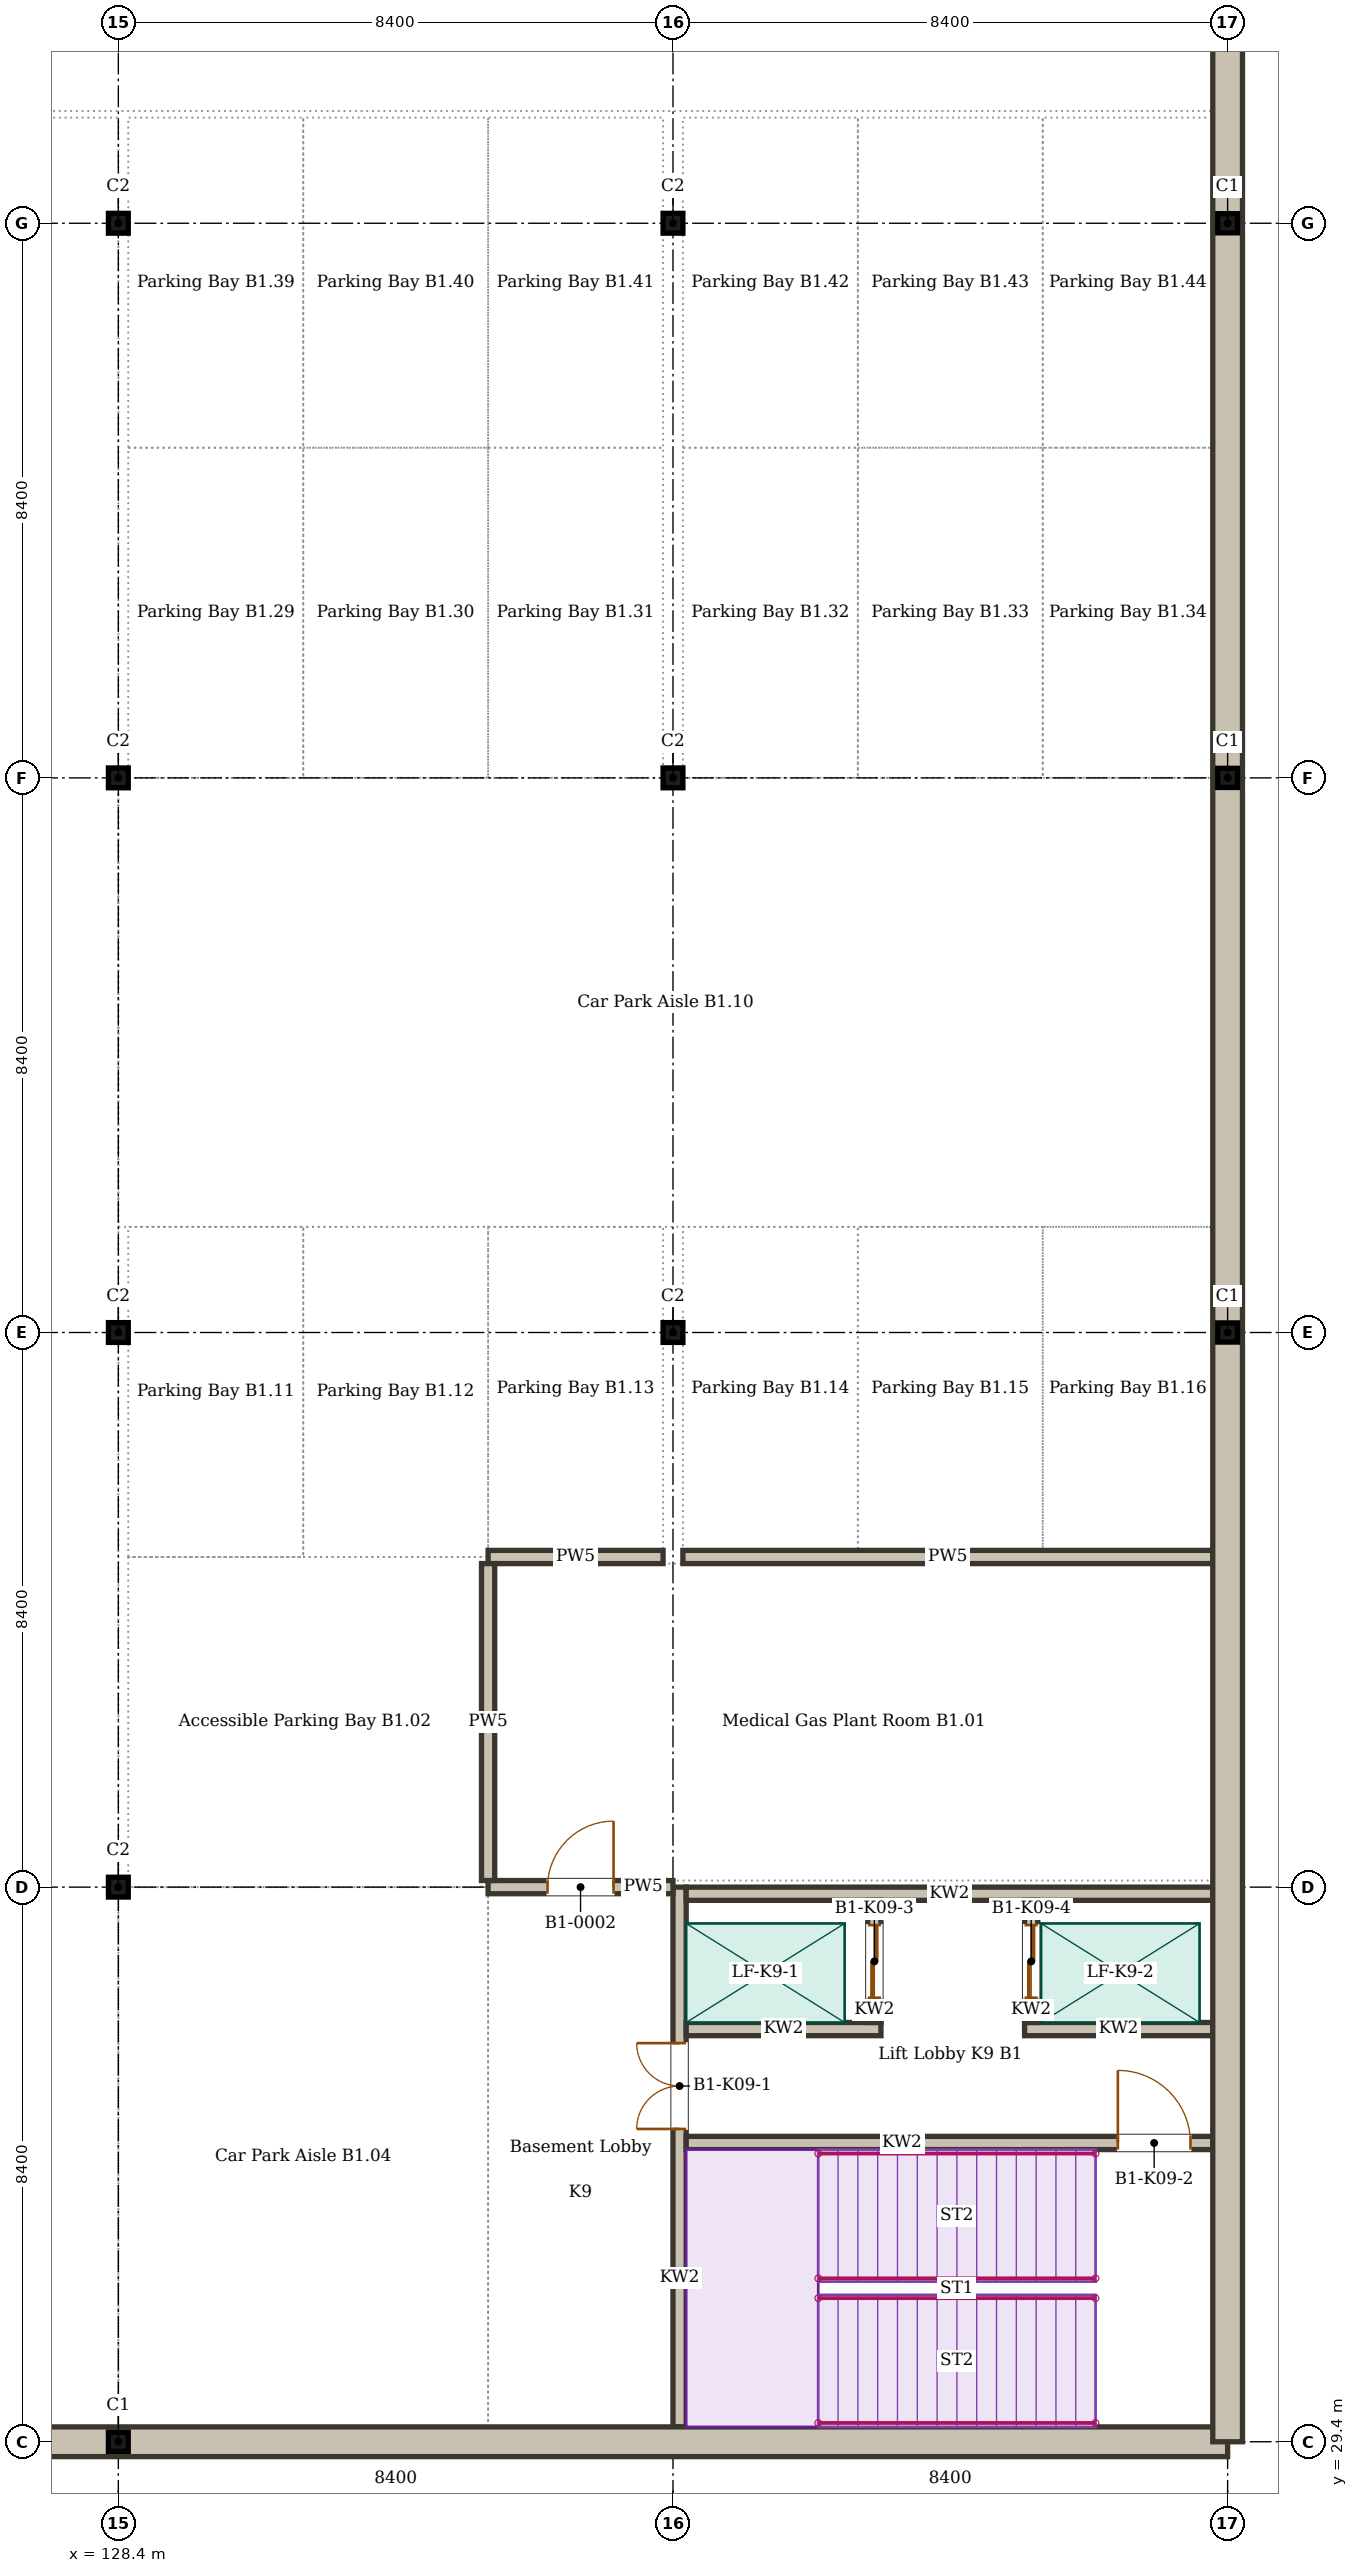
"""IFC4 building model, lengths in metres.
Left out: names, types, materials, properties, quantities, classifications, styles, units other than length and angle.
Written with IfcOpenShell. Run it as: python <this file> out.ifc"""

import sys

from ifc_helpers import new_model, si_unit, direction, frame, frame_2d, origin, origin_2d, place, context, subcontext, project, spatial, rectangle, i_section, extrude, element, fill, save


model = new_model("IFC4")
c1 = context("Model", 3, precision=1e-05, world=origin(), true_north=direction((0.0, 1.0)))
c2 = subcontext(c1, "Body", "Model", "MODEL_VIEW")
j1 = project(units=[si_unit("LENGTHUNIT", "METRE"), si_unit("PLANEANGLEUNIT", "RADIAN")], contexts=[c1])
p1 = place(None, origin())
s1 = spatial("IfcSite", under=j1, at=p1, CompositionType="ELEMENT")
p2 = place(p1, origin())
s2 = spatial("IfcBuilding", under=s1, at=p2, CompositionType="ELEMENT")
p3 = place(p2, frame((0.0, 0.0, -4.5)))
s3 = spatial("IfcBuildingStorey", under=s2, at=p3, CompositionType="ELEMENT", Elevation=-4.5)
p4 = place(p3, frame((128.4, 29.4, 0.0), z_axis=(0.0, 0.0, 1.0), x_axis=(1.0, 0.0, 0.0)))
e1 = element("IfcColumn", 1, at=p4, inside=s3, PredefinedType="COLUMN", context=c2, shape_type="SweptSolid", body=[
    extrude(i_section(OverallWidth=0.3, OverallDepth=0.29, WebThickness=0.009, FlangeThickness=0.014, FilletRadius=0.027, at=origin_2d()), origin(), (0.0, 0.0, 1.0), 4.5),
])
for number, where, z_axis, x_axis in (
    (2, (128.4, 37.8, 0.0), (0.0, 0.0, 1.0), (1.0, 0.0, 0.0)),
    (3, (128.4, 46.2, 0.0), (0.0, 0.0, 1.0), (1.0, 0.0, 0.0)),
    (4, (136.8, 46.2, 0.0), (0.0, 0.0, 1.0), (1.0, 0.0, 0.0)),
):
    element("IfcColumn", number, at=place(p3, frame(where, z_axis=z_axis, x_axis=x_axis)), inside=s3, PredefinedType="COLUMN", context=c2, shape_type="SweptSolid", body=[
        extrude(i_section(OverallWidth=0.3, OverallDepth=0.3, WebThickness=0.011, FlangeThickness=0.019, FilletRadius=0.027, at=origin_2d()), origin(), (0.0, 0.0, 1.0), 4.5),
    ])
p5 = place(p3, frame((145.2, 46.2, 0.0), z_axis=(0.0, 0.0, 1.0), x_axis=(1.0, 0.0, 0.0)))
e5 = element("IfcColumn", 5, at=p5, inside=s3, PredefinedType="COLUMN", context=c2, shape_type="SweptSolid", body=[
    extrude(i_section(OverallWidth=0.3, OverallDepth=0.29, WebThickness=0.009, FlangeThickness=0.014, FilletRadius=0.027, at=origin_2d()), origin(), (0.0, 0.0, 1.0), 4.5),
])
for number, where, z_axis, x_axis in (
    (6, (128.4, 54.6, 0.0), (0.0, 0.0, 1.0), (1.0, 0.0, 0.0)),
    (7, (136.8, 54.6, 0.0), (0.0, 0.0, 1.0), (1.0, 0.0, 0.0)),
):
    element("IfcColumn", number, at=place(p3, frame(where, z_axis=z_axis, x_axis=x_axis)), inside=s3, PredefinedType="COLUMN", context=c2, shape_type="SweptSolid", body=[
        extrude(i_section(OverallWidth=0.3, OverallDepth=0.3, WebThickness=0.011, FlangeThickness=0.019, FilletRadius=0.027, at=origin_2d()), origin(), (0.0, 0.0, 1.0), 4.5),
    ])
p6 = place(p3, frame((145.2, 54.6, 0.0), z_axis=(0.0, 0.0, 1.0), x_axis=(1.0, 0.0, 0.0)))
e8 = element("IfcColumn", 8, at=p6, inside=s3, PredefinedType="COLUMN", context=c2, shape_type="SweptSolid", body=[
    extrude(i_section(OverallWidth=0.3, OverallDepth=0.29, WebThickness=0.009, FlangeThickness=0.014, FilletRadius=0.027, at=origin_2d()), origin(), (0.0, 0.0, 1.0), 4.5),
])
for number, where, z_axis, x_axis in (
    (9, (128.4, 63.0, 0.0), (0.0, 0.0, 1.0), (1.0, 0.0, 0.0)),
    (10, (136.8, 63.0, 0.0), (0.0, 0.0, 1.0), (1.0, 0.0, 0.0)),
):
    element("IfcColumn", number, at=place(p3, frame(where, z_axis=z_axis, x_axis=x_axis)), inside=s3, PredefinedType="COLUMN", context=c2, shape_type="SweptSolid", body=[
        extrude(i_section(OverallWidth=0.3, OverallDepth=0.3, WebThickness=0.011, FlangeThickness=0.019, FilletRadius=0.027, at=origin_2d()), origin(), (0.0, 0.0, 1.0), 4.5),
    ])
p7 = place(p3, frame((145.2, 63.0, 0.0), z_axis=(0.0, 0.0, 1.0), x_axis=(1.0, 0.0, 0.0)))
e11 = element("IfcColumn", 11, at=p7, inside=s3, PredefinedType="COLUMN", context=c2, shape_type="SweptSolid", body=[
    extrude(i_section(OverallWidth=0.3, OverallDepth=0.29, WebThickness=0.009, FlangeThickness=0.014, FilletRadius=0.027, at=origin_2d()), origin(), (0.0, 0.0, 1.0), 4.5),
])
p8 = place(p3, frame((111.6, 29.4, 0.0), z_axis=(0.0, 0.0, 1.0), x_axis=(1.0, 0.0, 0.0)))
e12 = element("IfcWall", 12, at=p8, inside=s3, PredefinedType="SOLIDWALL", context=c2, shape_type="SweptSolid", body=[
    extrude(rectangle(XDim=33.6, YDim=0.45, at=frame_2d((16.8, 0.0))), origin(), (0.0, 0.0, 1.0), 4.35),
])
p9 = place(p3, frame((145.2, 29.4, 0.0), z_axis=(0.0, 0.0, 1.0), x_axis=(0.0, 1.0, 0.0)))
e13 = element("IfcWall", 13, at=p9, inside=s3, PredefinedType="SOLIDWALL", context=c2, shape_type="SweptSolid", body=[
    extrude(rectangle(XDim=75.6, YDim=0.45, at=frame_2d((37.8, 0.0))), origin(), (0.0, 0.0, 1.0), 4.35),
])
p10 = place(p3, frame((134.0, 37.8, 0.0), z_axis=(0.0, 0.0, 1.0), x_axis=(1.0, 0.0, 0.0)))
e14 = element("IfcWall", 14, at=p10, inside=s3, PredefinedType="SOLIDWALL", context=c2, shape_type="SweptSolid", body=[
    extrude(rectangle(XDim=2.8, YDim=0.2, at=frame_2d((1.4, 0.0))), origin(), (0.0, 0.0, 1.0), 3.8),
])
p11 = place(p10, frame((0.9, 0.0, 0.0)))
e15 = element("IfcOpeningElement", 15, at=p11, cuts=e14, PredefinedType="OPENING", context=c2, shape_type="SweptSolid", body=[
    extrude(rectangle(XDim=1.0, YDim=2.1, at=frame_2d((0.5, 1.05))), frame((0.0, 0.11, 0.0), z_axis=(0.0, -1.0, 0.0), x_axis=(1.0, 0.0, 0.0)), (0.0, 0.0, 1.0), 0.22),
])
p12 = place(p3, frame((134.0, 42.8, 0.0), z_axis=(0.0, 0.0, 1.0), x_axis=(1.0, 0.0, 0.0)))
e16 = element("IfcWall", 16, at=p12, inside=s3, PredefinedType="SOLIDWALL", context=c2, shape_type="SweptSolid", body=[
    extrude(rectangle(XDim=2.65, YDim=0.2, at=frame_2d((1.325, 0.0))), origin(), (0.0, 0.0, 1.0), 3.95),
])
p13 = place(p3, frame((136.95, 42.8, 0.0), z_axis=(0.0, 0.0, 1.0), x_axis=(1.0, 0.0, 0.0)))
e17 = element("IfcWall", 17, at=p13, inside=s3, PredefinedType="SOLIDWALL", context=c2, shape_type="SweptSolid", body=[
    extrude(rectangle(XDim=8.025, YDim=0.2, at=frame_2d((4.013, 0.0))), origin(), (0.0, 0.0, 1.0), 3.95),
])
p14 = place(p3, frame((134.0, 37.9, 0.0), z_axis=(0.0, 0.0, 1.0), x_axis=(0.0, 1.0, 0.0)))
e18 = element("IfcWall", 18, at=p14, inside=s3, PredefinedType="SOLIDWALL", context=c2, shape_type="SweptSolid", body=[
    extrude(rectangle(XDim=4.8, YDim=0.2, at=frame_2d((2.4, 0.0))), origin(), (0.0, 0.0, 1.0), 3.8),
])
p15 = place(p3, frame((136.9, 29.625, 0.0), z_axis=(0.0, 0.0, 1.0), x_axis=(0.0, 1.0, 0.0)))
e19 = element("IfcWall", 19, at=p15, inside=s3, PredefinedType="SOLIDWALL", context=c2, shape_type="SweptSolid", body=[
    extrude(rectangle(XDim=8.175, YDim=0.2, at=frame_2d((4.087, 0.0))), origin(), (0.0, 0.0, 1.0), 4.5),
])
p16 = place(p15, frame((4.512, 0.0, 0.0)))
e20 = element("IfcOpeningElement", 20, at=p16, cuts=e19, PredefinedType="OPENING", context=c2, shape_type="SweptSolid", body=[
    extrude(rectangle(XDim=1.3, YDim=2.1, at=frame_2d((0.65, 1.05))), frame((0.0, 0.11, 0.0), z_axis=(0.0, -1.0, 0.0), x_axis=(1.0, 0.0, 0.0)), (0.0, 0.0, 1.0), 0.22),
])
p17 = place(p3, frame((137.0, 37.7, 0.0), z_axis=(0.0, 0.0, 1.0), x_axis=(1.0, 0.0, 0.0)))
e21 = element("IfcWall", 21, at=p17, inside=s3, PredefinedType="SOLIDWALL", context=c2, shape_type="SweptSolid", body=[
    extrude(rectangle(XDim=7.975, YDim=0.2, at=frame_2d((3.988, 0.0))), origin(), (0.0, 0.0, 1.0), 4.5),
])
p18 = place(p3, frame((137.0, 33.925, 0.0), z_axis=(0.0, 0.0, 1.0), x_axis=(1.0, 0.0, 0.0)))
e22 = element("IfcWall", 22, at=p18, inside=s3, PredefinedType="SOLIDWALL", context=c2, shape_type="SweptSolid", body=[
    extrude(rectangle(XDim=7.975, YDim=0.2, at=frame_2d((3.988, 0.0))), origin(), (0.0, 0.0, 1.0), 4.5),
])
p19 = place(p18, frame((6.538, 0.0, 0.0)))
e23 = element("IfcOpeningElement", 23, at=p19, cuts=e22, PredefinedType="OPENING", context=c2, shape_type="SweptSolid", body=[
    extrude(rectangle(XDim=1.1, YDim=2.1, at=frame_2d((0.55, 1.05))), frame((0.0, 0.11, 0.0), z_axis=(0.0, -1.0, 0.0), x_axis=(1.0, 0.0, 0.0)), (0.0, 0.0, 1.0), 0.22),
])
p20 = place(p3, frame((137.0, 35.65, 0.0), z_axis=(0.0, 0.0, 1.0), x_axis=(1.0, 0.0, 0.0)))
e24 = element("IfcWall", 24, at=p20, inside=s3, PredefinedType="SOLIDWALL", context=c2, shape_type="SweptSolid", body=[
    extrude(rectangle(XDim=2.95, YDim=0.2, at=frame_2d((1.475, 0.0))), origin(), (0.0, 0.0, 1.0), 4.5),
])
p21 = place(p3, frame((142.125, 35.65, 0.0), z_axis=(0.0, 0.0, 1.0), x_axis=(1.0, 0.0, 0.0)))
e25 = element("IfcWall", 25, at=p21, inside=s3, PredefinedType="SOLIDWALL", context=c2, shape_type="SweptSolid", body=[
    extrude(rectangle(XDim=2.85, YDim=0.2, at=frame_2d((1.425, 0.0))), origin(), (0.0, 0.0, 1.0), 4.5),
])
p22 = place(p3, frame((139.85, 35.75, 0.0), z_axis=(0.0, 0.0, 1.0), x_axis=(0.0, 1.0, 0.0)))
e26 = element("IfcWall", 26, at=p22, inside=s3, PredefinedType="SOLIDWALL", context=c2, shape_type="SweptSolid", body=[
    extrude(rectangle(XDim=1.85, YDim=0.2, at=frame_2d((0.925, 0.0))), origin(), (0.0, 0.0, 1.0), 4.5),
])
p23 = place(p22, frame((0.375, 0.0, 0.0)))
e27 = element("IfcOpeningElement", 27, at=p23, cuts=e26, PredefinedType="OPENING", context=c2, shape_type="SweptSolid", body=[
    extrude(rectangle(XDim=1.1, YDim=2.1, at=frame_2d((0.55, 1.05))), frame((0.0, 0.11, 0.0), z_axis=(0.0, -1.0, 0.0), x_axis=(1.0, 0.0, 0.0)), (0.0, 0.0, 1.0), 0.22),
])
p24 = place(p3, frame((142.225, 35.75, 0.0), z_axis=(0.0, 0.0, 1.0), x_axis=(0.0, 1.0, 0.0)))
e28 = element("IfcWall", 28, at=p24, inside=s3, PredefinedType="SOLIDWALL", context=c2, shape_type="SweptSolid", body=[
    extrude(rectangle(XDim=1.85, YDim=0.2, at=frame_2d((0.925, 0.0))), origin(), (0.0, 0.0, 1.0), 4.5),
])
p25 = place(p24, frame((0.375, 0.0, 0.0)))
e29 = element("IfcOpeningElement", 29, at=p25, cuts=e28, PredefinedType="OPENING", context=c2, shape_type="SweptSolid", body=[
    extrude(rectangle(XDim=1.1, YDim=2.1, at=frame_2d((0.55, 1.05))), frame((0.0, 0.11, 0.0), z_axis=(0.0, -1.0, 0.0), x_axis=(1.0, 0.0, 0.0)), (0.0, 0.0, 1.0), 0.22),
])
p26 = place(p11, origin())
e30 = element("IfcDoor", 30, at=p26, inside=s3, OperationType="SINGLE_SWING_RIGHT", PredefinedType="DOOR", context=c2, shape_type="SweptSolid", body=[
    extrude(rectangle(XDim=1.0, YDim=2.1, at=frame_2d((0.5, 1.05))), frame((0.0, 0.025, 0.0), z_axis=(0.0, -1.0, 0.0), x_axis=(1.0, 0.0, 0.0)), (0.0, 0.0, 1.0), 0.05),
])
fill(e15, e30)
p27 = place(p16, origin())
e31 = element("IfcDoor", 31, at=p27, inside=s3, OperationType="DOUBLE_DOOR_DOUBLE_SWING", PredefinedType="DOOR", context=c2, shape_type="SweptSolid", body=[
    extrude(rectangle(XDim=1.3, YDim=2.1, at=frame_2d((0.65, 1.05))), frame((0.0, 0.025, 0.0), z_axis=(0.0, -1.0, 0.0), x_axis=(1.0, 0.0, 0.0)), (0.0, 0.0, 1.0), 0.05),
])
fill(e20, e31)
p28 = place(p19, origin())
e32 = element("IfcDoor", 32, at=p28, inside=s3, OperationType="SINGLE_SWING_LEFT", PredefinedType="DOOR", context=c2, shape_type="SweptSolid", body=[
    extrude(rectangle(XDim=1.1, YDim=2.1, at=frame_2d((0.55, 1.05))), frame((0.0, 0.025, 0.0), z_axis=(0.0, -1.0, 0.0), x_axis=(1.0, 0.0, 0.0)), (0.0, 0.0, 1.0), 0.05),
])
fill(e23, e32)
p29 = place(p23, origin())
e33 = element("IfcDoor", 33, at=p29, inside=s3, OperationType="DOUBLE_DOOR_SLIDING", PredefinedType="DOOR", context=c2, shape_type="SweptSolid", body=[
    extrude(rectangle(XDim=1.1, YDim=2.1, at=frame_2d((0.55, 1.05))), frame((0.0, 0.025, 0.0), z_axis=(0.0, -1.0, 0.0), x_axis=(1.0, 0.0, 0.0)), (0.0, 0.0, 1.0), 0.05),
])
fill(e27, e33)
p30 = place(p25, origin())
e34 = element("IfcDoor", 34, at=p30, inside=s3, OperationType="DOUBLE_DOOR_SLIDING", PredefinedType="DOOR", context=c2, shape_type="SweptSolid", body=[
    extrude(rectangle(XDim=1.1, YDim=2.1, at=frame_2d((0.55, 1.05))), frame((0.0, 0.025, 0.0), z_axis=(0.0, -1.0, 0.0), x_axis=(1.0, 0.0, 0.0)), (0.0, 0.0, 1.0), 0.05),
])
fill(e29, e34)
save(model, sys.argv[1])
